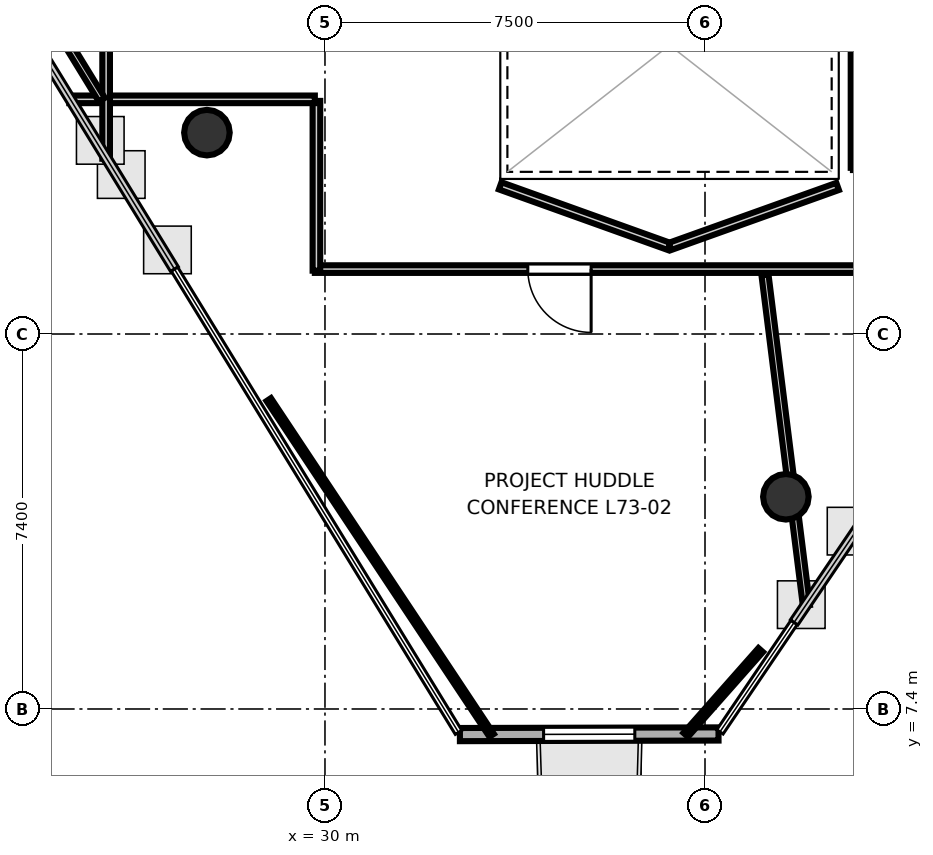
"""IFC4 building model, lengths in metres.
Left out: names, types, materials, properties, quantities, classifications, styles, units other than length and angle.
Written with IfcOpenShell. Run it as: python <this file> out.ifc"""

import sys

from ifc_helpers import new_model, si_unit, direction, frame, frame_2d, origin, origin_2d, place, context, subcontext, project, spatial, rectangle, hollow_circle, extrude, element, fill, save


model = new_model("IFC4")
c1 = context("Model", 3, precision=1e-05, world=origin(), true_north=direction((0.0, 1.0)))
c2 = subcontext(c1, "Body", "Model", "MODEL_VIEW")
j1 = project(units=[si_unit("LENGTHUNIT", "METRE"), si_unit("PLANEANGLEUNIT", "RADIAN")], contexts=[c1])
p1 = place(None, origin())
s1 = spatial("IfcSite", under=j1, at=p1, CompositionType="ELEMENT")
p2 = place(p1, origin())
s2 = spatial("IfcBuilding", under=s1, at=p2, CompositionType="ELEMENT")
p3 = place(p2, frame((0.0, 0.0, 284.3)))
s3 = spatial("IfcBuildingStorey", under=s2, at=p3, CompositionType="ELEMENT", Elevation=284.3)
for number, where, z_axis, x_axis in (
    (1, (27.67, 18.774, 0.0), (0.0, 0.0, 1.0), (1.0, 0.0, 0.0)),
    (2, (39.096, 11.588, 0.0), (0.0, 0.0, 1.0), (1.0, 0.0, 0.0)),
):
    element("IfcColumn", number, at=place(p3, frame(where, z_axis=z_axis, x_axis=x_axis)), inside=s3, PredefinedType="COLUMN", context=c2, shape_type="SweptSolid", body=[
        extrude(hollow_circle(Radius=0.45, WallThickness=0.025, at=origin_2d()), origin(), (0.0, 0.0, 1.0), 3.7),
    ])
p4 = place(p3, frame((32.663, 6.895, 0.0), z_axis=(0.0, 0.0, 1.0), x_axis=(0.999997253254, 0.002343818301, 0.0)))
e3 = element("IfcWall", 3, at=p4, inside=s3, PredefinedType="SOLIDWALL", context=c2, shape_type="SweptSolid", body=[
    extrude(rectangle(XDim=5.104, YDim=0.26, at=frame_2d((2.552, 0.0))), origin(), (0.0, 0.0, 1.0), 3.52),
])
p5 = place(p4, frame((1.652, 0.0, 0.85)))
e4 = element("IfcOpeningElement", 4, at=p5, cuts=e3, PredefinedType="OPENING", context=c2, shape_type="SweptSolid", body=[
    extrude(rectangle(XDim=1.8, YDim=2.1, at=frame_2d((0.9, 1.05))), frame((0.0, 0.14, 0.0), z_axis=(0.0, -1.0, 0.0), x_axis=(1.0, 0.0, 0.0)), (0.0, 0.0, 1.0), 0.28),
])
p6 = place(p3, frame((43.15, 18.111, 0.0), z_axis=(0.0, 0.0, 1.0), x_axis=(-1.0, 0.0, 0.0)))
e5 = element("IfcWall", 5, at=p6, inside=s3, PredefinedType="PARTITIONING", context=c2, shape_type="SweptSolid", body=[
    extrude(rectangle(XDim=2.73, YDim=0.15, at=frame_2d((1.365, 0.0))), origin(), (0.0, 0.0, 1.0), 2.84),
])
p7 = place(p6, frame((1.325, 0.0, 0.0)))
e6 = element("IfcOpeningElement", 6, at=p7, cuts=e5, PredefinedType="OPENING", context=c2, shape_type="SweptSolid", body=[
    extrude(rectangle(XDim=1.2, YDim=2.15, at=frame_2d((0.6, 1.075))), frame((0.0, 0.085, 0.0), z_axis=(0.0, -1.0, 0.0), x_axis=(1.0, 0.0, 0.0)), (0.0, 0.0, 1.0), 0.17),
])
p8 = place(p3, frame((40.451, 18.08, 0.0), z_axis=(0.0, 0.0, 1.0), x_axis=(0.0, 1.0, 0.0)))
e7 = element("IfcWall", 7, at=p8, inside=s3, PredefinedType="PARTITIONING", context=c2, shape_type="SweptSolid", body=[
    extrude(rectangle(XDim=3.32, YDim=0.15, at=frame_2d((1.66, 0.0))), origin(), (0.0, 0.0, 1.0), 2.84),
])
p9 = place(p3, frame((33.458, 17.724, 0.0), z_axis=(0.0, 0.0, 1.0), x_axis=(0.94128854789, -0.337603124408, 0.0)))
e8 = element("IfcWall", 8, at=p9, inside=s3, PredefinedType="PARTITIONING", context=c2, shape_type="SweptSolid", body=[
    extrude(rectangle(XDim=3.54, YDim=0.15, at=frame_2d((1.77, 0.0))), origin(), (0.0, 0.0, 1.0), 2.84),
])
p10 = place(p3, frame((36.81, 16.529, 0.0), z_axis=(0.0, 0.0, 1.0), x_axis=(0.941548344365, 0.33687789364, 0.0)))
e9 = element("IfcWall", 9, at=p10, inside=s3, PredefinedType="PARTITIONING", context=c2, shape_type="SweptSolid", body=[
    extrude(rectangle(XDim=3.513, YDim=0.15, at=frame_2d((1.756, 0.0))), origin(), (0.0, 0.0, 1.0), 2.84),
])
p11 = place(p3, frame((44.004, 16.081, 0.0), z_axis=(0.0, 0.0, 1.0), x_axis=(-1.0, 0.0, 0.0)))
e10 = element("IfcWall", 10, at=p11, inside=s3, PredefinedType="PARTITIONING", context=c2, shape_type="SweptSolid", body=[
    extrude(rectangle(XDim=14.204, YDim=0.15, at=frame_2d((7.102, 0.0))), origin(), (0.0, 0.0, 1.0), 2.84),
])
p12 = place(p11, frame((8.752, 0.0, 0.0)))
e11 = element("IfcOpeningElement", 11, at=p12, cuts=e10, PredefinedType="OPENING", context=c2, shape_type="SweptSolid", body=[
    extrude(rectangle(XDim=1.25, YDim=2.2, at=frame_2d((0.625, 1.1))), frame((0.0, 0.085, 0.0), z_axis=(0.0, -1.0, 0.0), x_axis=(1.0, 0.0, 0.0)), (0.0, 0.0, 1.0), 0.17),
])
p13 = place(p3, frame((29.831, 16.05, 0.0), z_axis=(0.0, 0.0, 1.0), x_axis=(0.0, 1.0, 0.0)))
e12 = element("IfcWall", 12, at=p13, inside=s3, PredefinedType="PARTITIONING", context=c2, shape_type="SweptSolid", body=[
    extrude(rectangle(XDim=3.35, YDim=0.15, at=frame_2d((1.675, 0.0))), origin(), (0.0, 0.0, 1.0), 2.84),
])
p14 = place(p3, frame((29.8, 19.431, 0.0), z_axis=(0.0, 0.0, 1.0), x_axis=(-1.0, 0.0, 0.0)))
e13 = element("IfcWall", 13, at=p14, inside=s3, PredefinedType="PARTITIONING", context=c2, shape_type="SweptSolid", body=[
    extrude(rectangle(XDim=4.845, YDim=0.15, at=frame_2d((2.423, 0.0))), origin(), (0.0, 0.0, 1.0), 2.84),
])
p15 = place(p3, frame((25.681, 18.26, 0.0), z_axis=(0.0, 0.0, 1.0), x_axis=(0.0, 1.0, 0.0)))
e14 = element("IfcWall", 14, at=p15, inside=s3, PredefinedType="PARTITIONING", context=c2, shape_type="SweptSolid", body=[
    extrude(rectangle(XDim=14.291, YDim=0.15, at=frame_2d((7.145, 0.0))), origin(), (0.0, 0.0, 1.0), 2.84),
])
p16 = place(p15, frame((5.229, 0.0, 0.0)))
e15 = element("IfcOpeningElement", 15, at=p16, cuts=e14, PredefinedType="OPENING", context=c2, shape_type="SweptSolid", body=[
    extrude(rectangle(XDim=1.25, YDim=2.2, at=frame_2d((0.625, 1.1))), frame((0.0, 0.085, 0.0), z_axis=(0.0, -1.0, 0.0), x_axis=(1.0, 0.0, 0.0)), (0.0, 0.0, 1.0), 0.17),
])
p17 = place(p15, frame((10.912, 0.0, 0.0)))
e16 = element("IfcOpeningElement", 16, at=p17, cuts=e14, PredefinedType="OPENING", context=c2, shape_type="SweptSolid", body=[
    extrude(rectangle(XDim=1.25, YDim=2.2, at=frame_2d((0.625, 1.1))), frame((0.0, 0.085, 0.0), z_axis=(0.0, -1.0, 0.0), x_axis=(1.0, 0.0, 0.0)), (0.0, 0.0, 1.0), 0.17),
])
p18 = place(p3, frame((25.596, 19.423, 0.0), z_axis=(0.0, 0.0, 1.0), x_axis=(-0.522792463497, 0.852459993261, 0.0)))
e17 = element("IfcWall", 17, at=p18, inside=s3, PredefinedType="PARTITIONING", context=c2, shape_type="SweptSolid", body=[
    extrude(rectangle(XDim=10.683, YDim=0.14, at=frame_2d((5.342, 0.0))), origin(), (0.0, 0.0, 1.0), 2.84),
])
p19 = place(p3, frame((33.289, 6.879, 0.0), z_axis=(0.0, 0.0, 1.0), x_axis=(-0.553091220441, 0.833120700661, 0.0)))
e18 = element("IfcWall", 18, at=p19, inside=s3, PredefinedType="PARTITIONING", context=c2, shape_type="SweptSolid", body=[
    extrude(rectangle(XDim=7.954, YDim=0.105, at=frame_2d((3.977, 0.0))), origin(), (0.0, 0.0, 1.0), 2.84),
])
p20 = place(p3, frame((38.684, 15.966, 0.0), z_axis=(0.0, 0.0, 1.0), x_axis=(0.12432723699, -0.992241270127, 0.0)))
e19 = element("IfcWall", 19, at=p20, inside=s3, PredefinedType="PARTITIONING", context=c2, shape_type="SweptSolid", body=[
    extrude(rectangle(XDim=6.574, YDim=0.14, at=frame_2d((3.287, 0.0))), origin(), (0.0, 0.0, 1.0), 2.84),
])
p21 = place(p3, frame((38.599, 8.563, 0.0), z_axis=(0.0, 0.0, 1.0), x_axis=(-0.662347566889, -0.749196703567, 0.0)))
e20 = element("IfcWall", 20, at=p21, inside=s3, PredefinedType="PARTITIONING", context=c2, shape_type="SweptSolid", body=[
    extrude(rectangle(XDim=2.235, YDim=0.12, at=frame_2d((1.117, 0.0))), origin(), (0.0, 0.0, 1.0), 2.84),
])
p22 = place(p12, origin())
e21 = element("IfcDoor", 21, at=p22, inside=s3, OperationType="SINGLE_SWING_LEFT", PredefinedType="DOOR", context=c2, shape_type="SweptSolid", body=[
    extrude(rectangle(XDim=1.25, YDim=2.2, at=frame_2d((0.625, 1.1))), frame((0.0, 0.025, 0.0), z_axis=(0.0, -1.0, 0.0), x_axis=(1.0, 0.0, 0.0)), (0.0, 0.0, 1.0), 0.05),
])
fill(e11, e21)
p23 = place(p5, origin())
e22 = element("IfcWindow", 22, at=p23, inside=s3, PartitioningType="SINGLE_PANEL", PredefinedType="WINDOW", context=c2, shape_type="SweptSolid", body=[
    extrude(rectangle(XDim=1.8, YDim=2.1, at=frame_2d((0.9, 1.05))), frame((0.0, 0.03, 0.0), z_axis=(0.0, -1.0, 0.0), x_axis=(1.0, 0.0, 0.0)), (0.0, 0.0, 1.0), 0.06),
])
fill(e4, e22)
save(model, sys.argv[1])
